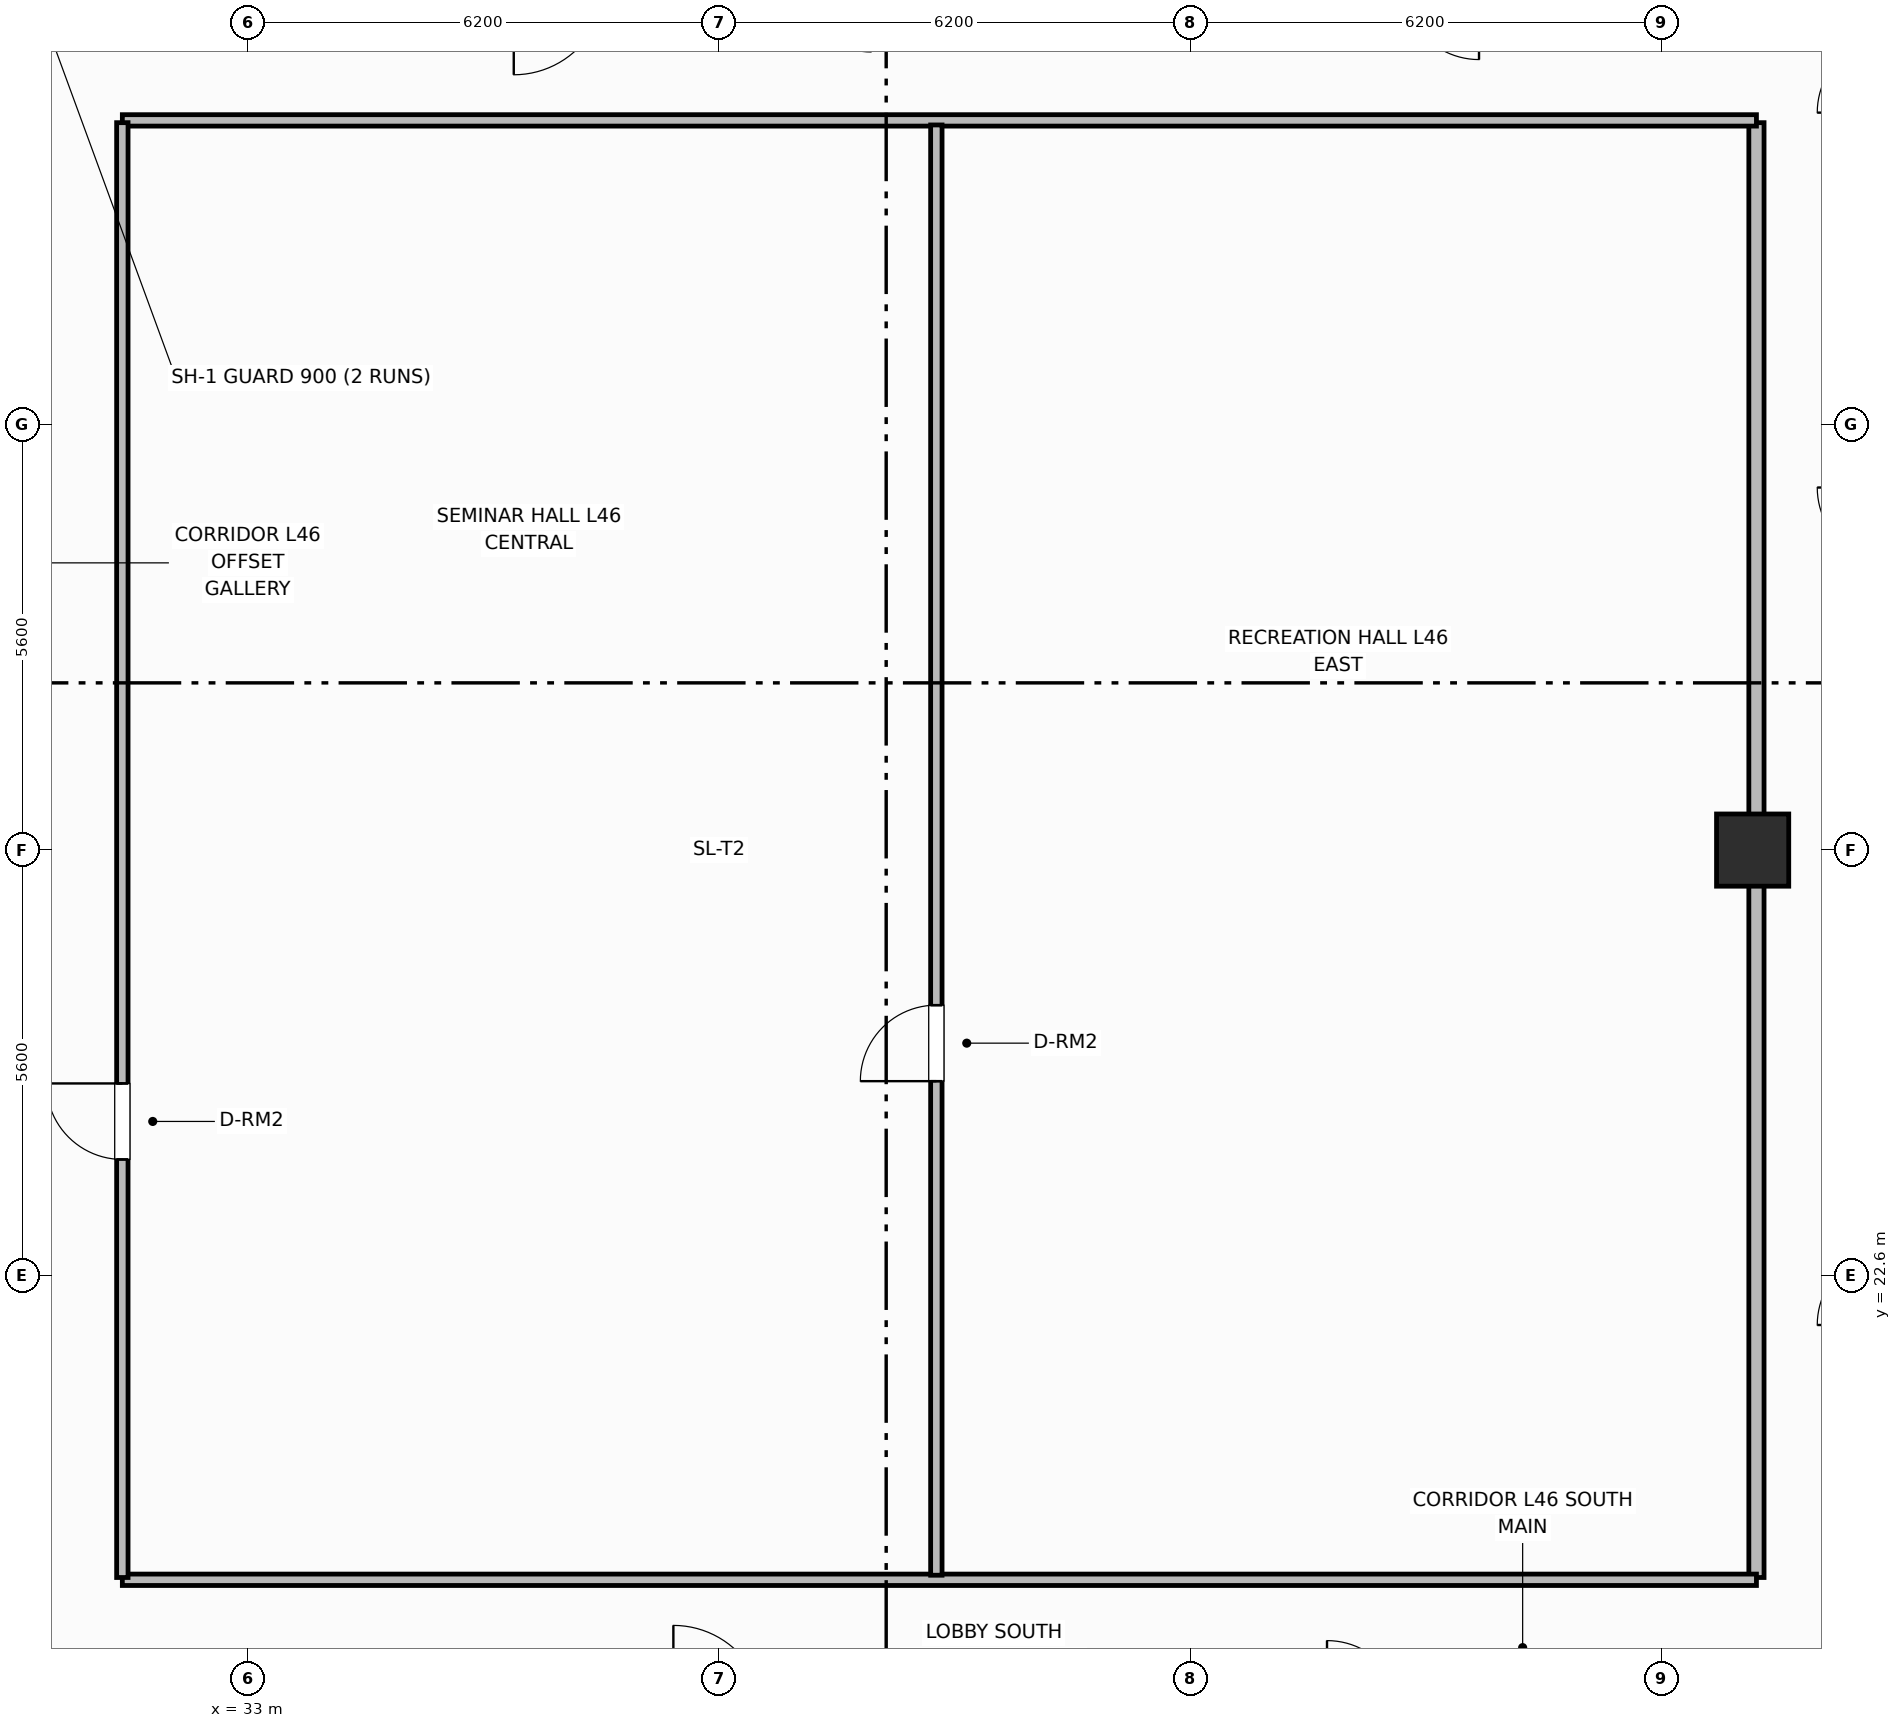
"""IFC4 building model, lengths in metres.
Left out: names, types, materials, properties, quantities, classifications, styles, units other than length and angle.
Written with IfcOpenShell. Run it as: python <this file> out.ifc"""

import sys

from ifc_helpers import new_model, si_unit, direction, frame, frame_2d, origin, origin_2d, place, context, subcontext, project, spatial, rectangle, extrude, element, fill, save


model = new_model("IFC4")
c1 = context("Model", 3, precision=1e-05, world=origin(), true_north=direction((0.0, 1.0)))
c2 = subcontext(c1, "Body", "Model", "MODEL_VIEW")
j1 = project(units=[si_unit("LENGTHUNIT", "METRE"), si_unit("PLANEANGLEUNIT", "RADIAN")], contexts=[c1])
p1 = place(None, origin())
s1 = spatial("IfcSite", under=j1, at=p1, CompositionType="ELEMENT")
p2 = place(p1, origin())
s2 = spatial("IfcBuilding", under=s1, at=p2, CompositionType="ELEMENT")
p3 = place(p2, frame((0.0, 0.0, 184.8)))
s3 = spatial("IfcBuildingStorey", under=s2, at=p3, CompositionType="ELEMENT", Elevation=184.8)
p4 = place(p3, frame((52.8, 28.2, 0.0), z_axis=(0.0, 0.0, 1.0), x_axis=(1.0, 0.0, 0.0)))
e1 = element("IfcColumn", 1, at=p4, inside=s3, PredefinedType="COLUMN", context=c2, shape_type="SweptSolid", body=[
    extrude(rectangle(XDim=0.95, YDim=0.95, at=origin_2d()), origin(), (0.0, 0.0, 1.0), 3.7),
])
p5 = place(p3, frame((52.85, 18.63, 0.0), z_axis=(0.0, 0.0, 1.0), x_axis=(0.0, 1.0, 0.0)))
e2 = element("IfcWall", 2, at=p5, inside=s3, PredefinedType="PARTITIONING", context=c2, shape_type="SweptSolid", body=[
    extrude(rectangle(XDim=19.14, YDim=0.2, at=frame_2d((9.57, 0.0))), origin(), (0.0, 0.0, 1.0), 2.55),
])
for number, where, z_axis, x_axis in (
    (3, (31.35, 18.6, 0.0), (0.0, 0.0, 1.0), (1.0, 0.0, 0.0)),
    (4, (31.35, 37.8, 0.0), (0.0, 0.0, 1.0), (1.0, 0.0, 0.0)),
):
    element("IfcWall", number, at=place(p3, frame(where, z_axis=z_axis, x_axis=x_axis)), inside=s3, PredefinedType="PARTITIONING", context=c2, shape_type="SweptSolid", body=[
        extrude(rectangle(XDim=21.5, YDim=0.15, at=frame_2d((10.75, 0.0))), origin(), (0.0, 0.0, 1.0), 2.55),
    ])
p6 = place(p3, frame((42.06, 18.66, 0.0), z_axis=(0.0, 0.0, 1.0), x_axis=(0.0, 1.0, 0.0)))
e5 = element("IfcWall", 5, at=p6, inside=s3, PredefinedType="PARTITIONING", context=c2, shape_type="SweptSolid", body=[
    extrude(rectangle(XDim=19.08, YDim=0.15, at=frame_2d((9.54, 0.0))), origin(), (0.0, 0.0, 1.0), 2.55),
])
p7 = place(p6, frame((6.5, 0.0, 0.0)))
e6 = element("IfcOpeningElement", 6, at=p7, cuts=e5, PredefinedType="OPENING", context=c2, shape_type="SweptSolid", body=[
    extrude(rectangle(XDim=1.0, YDim=2.15, at=frame_2d((0.5, 1.075))), frame((0.0, 0.085, 0.0), z_axis=(0.0, -1.0, 0.0), x_axis=(1.0, 0.0, 0.0)), (0.0, 0.0, 1.0), 0.17),
])
p8 = place(p3, frame((31.35, 18.63, 0.0), z_axis=(0.0, 0.0, 1.0), x_axis=(0.0, 1.0, 0.0)))
e7 = element("IfcWall", 7, at=p8, inside=s3, PredefinedType="PARTITIONING", context=c2, shape_type="SweptSolid", body=[
    extrude(rectangle(XDim=19.14, YDim=0.15, at=frame_2d((9.57, 0.0))), origin(), (0.0, 0.0, 1.0), 2.55),
])
p9 = place(p8, frame((5.5, 0.0, 0.0)))
e8 = element("IfcOpeningElement", 8, at=p9, cuts=e7, PredefinedType="OPENING", context=c2, shape_type="SweptSolid", body=[
    extrude(rectangle(XDim=1.0, YDim=2.15, at=frame_2d((0.5, 1.075))), frame((0.0, 0.085, 0.0), z_axis=(0.0, -1.0, 0.0), x_axis=(1.0, 0.0, 0.0)), (0.0, 0.0, 1.0), 0.17),
])
p10 = place(p7, origin())
e9 = element("IfcDoor", 9, at=p10, inside=s3, OperationType="SINGLE_SWING_LEFT", PredefinedType="DOOR", context=c2, shape_type="SweptSolid", body=[
    extrude(rectangle(XDim=1.0, YDim=2.15, at=frame_2d((0.5, 1.075))), frame((0.0, 0.025, 0.0), z_axis=(0.0, -1.0, 0.0), x_axis=(1.0, 0.0, 0.0)), (0.0, 0.0, 1.0), 0.05),
])
fill(e6, e9)
p11 = place(p9, origin())
e10 = element("IfcDoor", 10, at=p11, inside=s3, OperationType="SINGLE_SWING_RIGHT", PredefinedType="DOOR", context=c2, shape_type="SweptSolid", body=[
    extrude(rectangle(XDim=1.0, YDim=2.15, at=frame_2d((0.5, 1.075))), frame((0.0, 0.025, 0.0), z_axis=(0.0, -1.0, 0.0), x_axis=(1.0, 0.0, 0.0)), (0.0, 0.0, 1.0), 0.05),
])
fill(e8, e10)
save(model, sys.argv[1])
